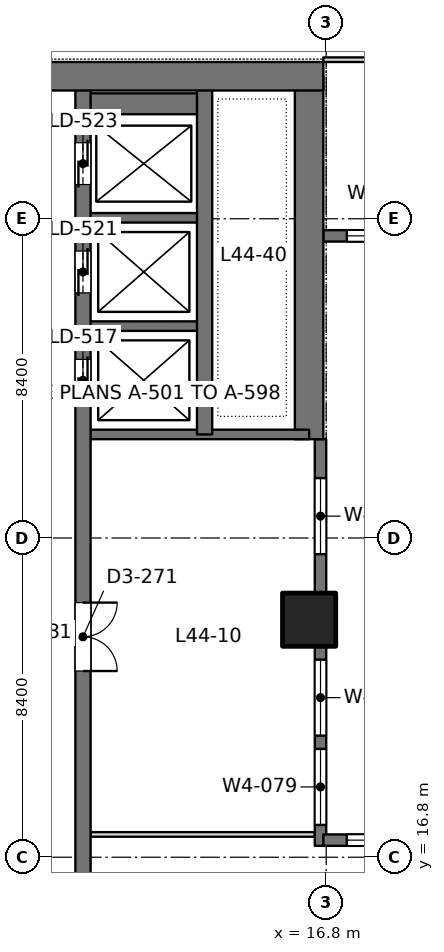
"""IFC4 building model, lengths in metres.
Left out: names, types, materials, properties, quantities, classifications, styles, units other than length and angle.
Written with IfcOpenShell. Run it as: python <this file> out.ifc"""

import sys

from ifc_helpers import new_model, si_unit, direction, frame, frame_2d, origin, origin_2d, place, context, subcontext, project, spatial, rectangle, extrude, element, fill, save


model = new_model("IFC4")
c1 = context("Model", 3, precision=1e-05, world=origin(), true_north=direction((0.0, 1.0)))
c2 = subcontext(c1, "Body", "Model", "MODEL_VIEW")
j1 = project(units=[si_unit("LENGTHUNIT", "METRE"), si_unit("PLANEANGLEUNIT", "RADIAN")], contexts=[c1])
p1 = place(None, origin())
s1 = spatial("IfcSite", under=j1, at=p1, CompositionType="ELEMENT")
p2 = place(p1, origin())
s2 = spatial("IfcBuilding", under=s1, at=p2, CompositionType="ELEMENT")
p3 = place(p2, frame((0.0, 0.0, 194.4)))
s3 = spatial("IfcBuildingStorey", under=s2, at=p3, CompositionType="ELEMENT", Elevation=194.4)
p4 = place(p3, frame((16.35, 23.05, 0.0), z_axis=(0.0, 0.0, 1.0), x_axis=(1.0, 0.0, 0.0)))
e1 = element("IfcColumn", 1, at=p4, inside=s3, PredefinedType="COLUMN", context=c2, shape_type="SweptSolid", body=[
    extrude(rectangle(XDim=1.4, YDim=1.4, at=origin_2d()), origin(), (0.0, 0.0, 1.0), 4.2),
])
p5 = place(p3, frame((-1.125, 37.35, 0.0), z_axis=(0.0, 0.0, 1.0), x_axis=(1.0, 0.0, 0.0)))
e2 = element("IfcWall", 2, at=p5, inside=s3, PredefinedType="SHEAR", context=c2, shape_type="SweptSolid", body=[
    extrude(rectangle(XDim=17.85, YDim=0.75, at=frame_2d((8.925, 0.0))), origin(), (0.0, 0.0, 1.0), 4.2),
])
p6 = place(p5, frame((8.875, 0.0, 0.0)))
e3 = element("IfcOpeningElement", 3, at=p6, cuts=e2, PredefinedType="OPENING", context=c2, shape_type="SweptSolid", body=[
    extrude(rectangle(XDim=1.8, YDim=2.4, at=frame_2d((0.9, 1.2))), frame((0.0, 0.385, 0.0), z_axis=(0.0, -1.0, 0.0), x_axis=(1.0, 0.0, 0.0)), (0.0, 0.0, 1.0), 0.77),
])
p7 = place(p3, frame((16.35, 27.8, 0.0), z_axis=(0.0, 0.0, 1.0), x_axis=(0.0, 1.0, 0.0)))
e4 = element("IfcWall", 4, at=p7, inside=s3, PredefinedType="SHEAR", context=c2, shape_type="SweptSolid", body=[
    extrude(rectangle(XDim=9.55, YDim=0.75, at=frame_2d((4.775, 0.0))), origin(), (0.0, 0.0, 1.0), 4.2),
])
p8 = place(p3, frame((10.4, 13.05, 0.0), z_axis=(0.0, 0.0, 1.0), x_axis=(0.0, 1.0, 0.0)))
e5 = element("IfcWall", 5, at=p8, inside=s3, PredefinedType="SHEAR", context=c2, shape_type="SweptSolid", body=[
    extrude(rectangle(XDim=24.3, YDim=0.4, at=frame_2d((12.15, 0.0))), origin(), (0.0, 0.0, 1.0), 4.2),
])
p9 = place(p8, frame((15.75, 0.0, 0.0)))
e6 = element("IfcOpeningElement", 6, at=p9, cuts=e5, PredefinedType="OPENING", context=c2, shape_type="SweptSolid", body=[
    extrude(rectangle(XDim=1.1, YDim=2.2, at=frame_2d((0.55, 1.1))), frame((0.0, 0.21, 0.0), z_axis=(0.0, -1.0, 0.0), x_axis=(1.0, 0.0, 0.0)), (0.0, 0.0, 1.0), 0.42),
])
p10 = place(p8, frame((18.6, 0.0, 0.0)))
e7 = element("IfcOpeningElement", 7, at=p10, cuts=e5, PredefinedType="OPENING", context=c2, shape_type="SweptSolid", body=[
    extrude(rectangle(XDim=1.1, YDim=2.2, at=frame_2d((0.55, 1.1))), frame((0.0, 0.21, 0.0), z_axis=(0.0, -1.0, 0.0), x_axis=(1.0, 0.0, 0.0)), (0.0, 0.0, 1.0), 0.42),
])
p11 = place(p8, frame((21.45, 0.0, 0.0)))
e8 = element("IfcOpeningElement", 8, at=p11, cuts=e5, PredefinedType="OPENING", context=c2, shape_type="SweptSolid", body=[
    extrude(rectangle(XDim=1.1, YDim=2.2, at=frame_2d((0.55, 1.1))), frame((0.0, 0.21, 0.0), z_axis=(0.0, -1.0, 0.0), x_axis=(1.0, 0.0, 0.0)), (0.0, 0.0, 1.0), 0.42),
])
p12 = place(p8, frame((8.65, 0.0, 0.0)))
e9 = element("IfcOpeningElement", 9, at=p12, cuts=e5, PredefinedType="OPENING", context=c2, shape_type="SweptSolid", body=[
    extrude(rectangle(XDim=1.8, YDim=2.4, at=frame_2d((0.9, 1.2))), frame((0.0, 0.21, 0.0), z_axis=(0.0, -1.0, 0.0), x_axis=(1.0, 0.0, 0.0)), (0.0, 0.0, 1.0), 0.42),
])
p13 = place(p3, frame((13.6, 27.925, 0.0), z_axis=(0.0, 0.0, 1.0), x_axis=(0.0, 1.0, 0.0)))
e10 = element("IfcWall", 10, at=p13, inside=s3, PredefinedType="SHEAR", context=c2, shape_type="SweptSolid", body=[
    extrude(rectangle(XDim=9.425, YDim=0.4, at=frame_2d((4.712, 0.0))), origin(), (0.0, 0.0, 1.0), 4.2),
])
p14 = place(p3, frame((10.4, 27.925, 0.0), z_axis=(0.0, 0.0, 1.0), x_axis=(1.0, 0.0, 0.0)))
e11 = element("IfcWall", 11, at=p14, inside=s3, PredefinedType="SHEAR", context=c2, shape_type="SweptSolid", body=[
    extrude(rectangle(XDim=5.95, YDim=0.25, at=frame_2d((2.975, 0.0))), origin(), (0.0, 0.0, 1.0), 4.2),
])
for number, where, z_axis, x_axis in (
    (12, (10.4, 30.775, 0.0), (0.0, 0.0, 1.0), (1.0, 0.0, 0.0)),
    (13, (10.4, 33.625, 0.0), (0.0, 0.0, 1.0), (1.0, 0.0, 0.0)),
):
    element("IfcWall", number, at=place(p3, frame(where, z_axis=z_axis, x_axis=x_axis)), inside=s3, PredefinedType="SHEAR", context=c2, shape_type="SweptSolid", body=[
        extrude(rectangle(XDim=3.2, YDim=0.25, at=frame_2d((1.6, 0.0))), origin(), (0.0, 0.0, 1.0), 4.2),
    ])
p15 = place(p3, frame((10.4, 36.625, 0.0), z_axis=(0.0, 0.0, 1.0), x_axis=(1.0, 0.0, 0.0)))
e14 = element("IfcWall", 14, at=p15, inside=s3, PredefinedType="SHEAR", context=c2, shape_type="SweptSolid", body=[
    extrude(rectangle(XDim=3.2, YDim=0.55, at=frame_2d((1.6, 0.0))), origin(), (0.0, 0.0, 1.0), 4.2),
])
p16 = place(p3, frame((16.65, 17.1, 0.0), z_axis=(0.0, 0.0, 1.0), x_axis=(0.0, 1.0, 0.0)))
e15 = element("IfcWall", 15, at=p16, inside=s3, PredefinedType="SOLIDWALL", context=c2, shape_type="SweptSolid", body=[
    extrude(rectangle(XDim=10.7, YDim=0.3, at=frame_2d((5.35, 0.0))), origin(), (0.0, 0.0, 1.0), 4.05),
])
p17 = place(p16, frame((0.55, 0.0, 0.9)))
e16 = element("IfcOpeningElement", 16, at=p17, cuts=e15, PredefinedType="OPENING", context=c2, shape_type="SweptSolid", body=[
    extrude(rectangle(XDim=2.0, YDim=1.9, at=frame_2d((1.0, 0.95))), frame((0.0, 0.16, 0.0), z_axis=(0.0, -1.0, 0.0), x_axis=(1.0, 0.0, 0.0)), (0.0, 0.0, 1.0), 0.32),
])
p18 = place(p16, frame((2.9, 0.0, 0.9)))
e17 = element("IfcOpeningElement", 17, at=p18, cuts=e15, PredefinedType="OPENING", context=c2, shape_type="SweptSolid", body=[
    extrude(rectangle(XDim=2.0, YDim=1.9, at=frame_2d((1.0, 0.95))), frame((0.0, 0.16, 0.0), z_axis=(0.0, -1.0, 0.0), x_axis=(1.0, 0.0, 0.0)), (0.0, 0.0, 1.0), 0.32),
])
p19 = place(p16, frame((7.675, 0.0, 0.9)))
e18 = element("IfcOpeningElement", 18, at=p19, cuts=e15, PredefinedType="OPENING", context=c2, shape_type="SweptSolid", body=[
    extrude(rectangle(XDim=2.0, YDim=1.9, at=frame_2d((1.0, 0.95))), frame((0.0, 0.16, 0.0), z_axis=(0.0, -1.0, 0.0), x_axis=(1.0, 0.0, 0.0)), (0.0, 0.0, 1.0), 0.32),
])
p20 = place(p3, frame((16.725, 17.25, 0.0), z_axis=(0.0, 0.0, 1.0), x_axis=(1.0, 0.0, 0.0)))
e19 = element("IfcWall", 19, at=p20, inside=s3, PredefinedType="SOLIDWALL", context=c2, shape_type="SweptSolid", body=[
    extrude(rectangle(XDim=7.925, YDim=0.3, at=frame_2d((3.962, 0.0))), origin(), (0.0, 0.0, 1.0), 4.05),
])
p21 = place(p20, frame((0.619, 0.0, 0.9)))
e20 = element("IfcOpeningElement", 20, at=p21, cuts=e19, PredefinedType="OPENING", context=c2, shape_type="SweptSolid", body=[
    extrude(rectangle(XDim=2.0, YDim=1.9, at=frame_2d((1.0, 0.95))), frame((0.0, 0.16, 0.0), z_axis=(0.0, -1.0, 0.0), x_axis=(1.0, 0.0, 0.0)), (0.0, 0.0, 1.0), 0.32),
])
p22 = place(p20, frame((3.238, 0.0, 0.9)))
e21 = element("IfcOpeningElement", 21, at=p22, cuts=e19, PredefinedType="OPENING", context=c2, shape_type="SweptSolid", body=[
    extrude(rectangle(XDim=2.0, YDim=1.9, at=frame_2d((1.0, 0.95))), frame((0.0, 0.16, 0.0), z_axis=(0.0, -1.0, 0.0), x_axis=(1.0, 0.0, 0.0)), (0.0, 0.0, 1.0), 0.32),
])
p23 = place(p20, frame((5.856, 0.0, 0.9)))
e22 = element("IfcOpeningElement", 22, at=p23, cuts=e19, PredefinedType="OPENING", context=c2, shape_type="SweptSolid", body=[
    extrude(rectangle(XDim=2.0, YDim=1.9, at=frame_2d((1.0, 0.95))), frame((0.0, 0.16, 0.0), z_axis=(0.0, -1.0, 0.0), x_axis=(1.0, 0.0, 0.0)), (0.0, 0.0, 1.0), 0.32),
])
p24 = place(p3, frame((16.725, 33.15, 0.0), z_axis=(0.0, 0.0, 1.0), x_axis=(1.0, 0.0, 0.0)))
e23 = element("IfcWall", 23, at=p24, inside=s3, PredefinedType="SOLIDWALL", context=c2, shape_type="SweptSolid", body=[
    extrude(rectangle(XDim=7.925, YDim=0.3, at=frame_2d((3.962, 0.0))), origin(), (0.0, 0.0, 1.0), 4.05),
])
p25 = place(p24, frame((0.619, 0.0, 0.9)))
e24 = element("IfcOpeningElement", 24, at=p25, cuts=e23, PredefinedType="OPENING", context=c2, shape_type="SweptSolid", body=[
    extrude(rectangle(XDim=2.0, YDim=1.9, at=frame_2d((1.0, 0.95))), frame((0.0, 0.16, 0.0), z_axis=(0.0, -1.0, 0.0), x_axis=(1.0, 0.0, 0.0)), (0.0, 0.0, 1.0), 0.32),
])
p26 = place(p24, frame((3.238, 0.0, 0.9)))
e25 = element("IfcOpeningElement", 25, at=p26, cuts=e23, PredefinedType="OPENING", context=c2, shape_type="SweptSolid", body=[
    extrude(rectangle(XDim=2.0, YDim=1.9, at=frame_2d((1.0, 0.95))), frame((0.0, 0.16, 0.0), z_axis=(0.0, -1.0, 0.0), x_axis=(1.0, 0.0, 0.0)), (0.0, 0.0, 1.0), 0.32),
])
p27 = place(p24, frame((5.856, 0.0, 0.9)))
e26 = element("IfcOpeningElement", 26, at=p27, cuts=e23, PredefinedType="OPENING", context=c2, shape_type="SweptSolid", body=[
    extrude(rectangle(XDim=2.0, YDim=1.9, at=frame_2d((1.0, 0.95))), frame((0.0, 0.16, 0.0), z_axis=(0.0, -1.0, 0.0), x_axis=(1.0, 0.0, 0.0)), (0.0, 0.0, 1.0), 0.32),
])
p28 = place(p3, frame((10.598, 17.4, 0.0), z_axis=(0.0, 0.0, 1.0), x_axis=(1.0, 0.0, 0.0)))
e27 = element("IfcWall", 27, at=p28, inside=s3, PredefinedType="PARTITIONING", context=c2, shape_type="SweptSolid", body=[
    extrude(rectangle(XDim=5.904, YDim=0.12, at=frame_2d((2.952, 0.0))), origin(), (0.0, 0.0, 1.0), 3.55),
])
p29 = place(p3, frame((16.725, 37.785, 0.0), z_axis=(0.0, 0.0, 1.0), x_axis=(1.0, 0.0, 0.0)))
e28 = element("IfcWall", 28, at=p29, inside=s3, PredefinedType="PARTITIONING", context=c2, shape_type="SweptSolid", body=[
    extrude(rectangle(XDim=16.95, YDim=0.12, at=frame_2d((8.475, 0.0))), origin(), (0.0, 0.0, 1.0), 3.55),
])
p30 = place(p29, frame((7.575, 0.0, 0.0)))
e29 = element("IfcOpeningElement", 29, at=p30, cuts=e28, PredefinedType="OPENING", context=c2, shape_type="SweptSolid", body=[
    extrude(rectangle(XDim=1.8, YDim=2.2, at=frame_2d((0.9, 1.1))), frame((0.0, 0.07, 0.0), z_axis=(0.0, -1.0, 0.0), x_axis=(1.0, 0.0, 0.0)), (0.0, 0.0, 1.0), 0.14),
])
p31 = place(p17, origin())
e30 = element("IfcWindow", 30, at=p31, inside=s3, PartitioningType="SINGLE_PANEL", PredefinedType="WINDOW", context=c2, shape_type="SweptSolid", body=[
    extrude(rectangle(XDim=2.0, YDim=1.9, at=frame_2d((1.0, 0.95))), frame((0.0, 0.03, 0.0), z_axis=(0.0, -1.0, 0.0), x_axis=(1.0, 0.0, 0.0)), (0.0, 0.0, 1.0), 0.06),
])
fill(e16, e30)
p32 = place(p18, origin())
e31 = element("IfcWindow", 31, at=p32, inside=s3, PartitioningType="SINGLE_PANEL", PredefinedType="WINDOW", context=c2, shape_type="SweptSolid", body=[
    extrude(rectangle(XDim=2.0, YDim=1.9, at=frame_2d((1.0, 0.95))), frame((0.0, 0.03, 0.0), z_axis=(0.0, -1.0, 0.0), x_axis=(1.0, 0.0, 0.0)), (0.0, 0.0, 1.0), 0.06),
])
fill(e17, e31)
p33 = place(p19, origin())
e32 = element("IfcWindow", 32, at=p33, inside=s3, PartitioningType="SINGLE_PANEL", PredefinedType="WINDOW", context=c2, shape_type="SweptSolid", body=[
    extrude(rectangle(XDim=2.0, YDim=1.9, at=frame_2d((1.0, 0.95))), frame((0.0, 0.03, 0.0), z_axis=(0.0, -1.0, 0.0), x_axis=(1.0, 0.0, 0.0)), (0.0, 0.0, 1.0), 0.06),
])
fill(e18, e32)
p34 = place(p21, origin())
e33 = element("IfcWindow", 33, at=p34, inside=s3, PartitioningType="SINGLE_PANEL", PredefinedType="WINDOW", context=c2, shape_type="SweptSolid", body=[
    extrude(rectangle(XDim=2.0, YDim=1.9, at=frame_2d((1.0, 0.95))), frame((0.0, 0.03, 0.0), z_axis=(0.0, -1.0, 0.0), x_axis=(1.0, 0.0, 0.0)), (0.0, 0.0, 1.0), 0.06),
])
fill(e20, e33)
p35 = place(p25, origin())
e34 = element("IfcWindow", 34, at=p35, inside=s3, PartitioningType="SINGLE_PANEL", PredefinedType="WINDOW", context=c2, shape_type="SweptSolid", body=[
    extrude(rectangle(XDim=2.0, YDim=1.9, at=frame_2d((1.0, 0.95))), frame((0.0, 0.03, 0.0), z_axis=(0.0, -1.0, 0.0), x_axis=(1.0, 0.0, 0.0)), (0.0, 0.0, 1.0), 0.06),
])
fill(e24, e34)
p36 = place(p9, origin())
e35 = element("IfcDoor", 35, at=p36, inside=s3, OperationType="DOUBLE_DOOR_SLIDING", PredefinedType="DOOR", context=c2, shape_type="SweptSolid", body=[
    extrude(rectangle(XDim=1.1, YDim=2.2, at=frame_2d((0.55, 1.1))), frame((0.0, 0.025, 0.0), z_axis=(0.0, -1.0, 0.0), x_axis=(1.0, 0.0, 0.0)), (0.0, 0.0, 1.0), 0.05),
])
fill(e6, e35)
p37 = place(p10, origin())
e36 = element("IfcDoor", 36, at=p37, inside=s3, OperationType="DOUBLE_DOOR_SLIDING", PredefinedType="DOOR", context=c2, shape_type="SweptSolid", body=[
    extrude(rectangle(XDim=1.1, YDim=2.2, at=frame_2d((0.55, 1.1))), frame((0.0, 0.025, 0.0), z_axis=(0.0, -1.0, 0.0), x_axis=(1.0, 0.0, 0.0)), (0.0, 0.0, 1.0), 0.05),
])
fill(e7, e36)
p38 = place(p11, origin())
e37 = element("IfcDoor", 37, at=p38, inside=s3, OperationType="DOUBLE_DOOR_SLIDING", PredefinedType="DOOR", context=c2, shape_type="SweptSolid", body=[
    extrude(rectangle(XDim=1.1, YDim=2.2, at=frame_2d((0.55, 1.1))), frame((0.0, 0.025, 0.0), z_axis=(0.0, -1.0, 0.0), x_axis=(1.0, 0.0, 0.0)), (0.0, 0.0, 1.0), 0.05),
])
fill(e8, e37)
p39 = place(p12, frame((1.8, 0.0, 0.0), z_axis=(0.0, 0.0, 1.0), x_axis=(-1.0, 0.0, 0.0)))
e38 = element("IfcDoor", 38, at=p39, inside=s3, OperationType="DOUBLE_DOOR_SINGLE_SWING", PredefinedType="DOOR", context=c2, shape_type="SweptSolid", body=[
    extrude(rectangle(XDim=1.8, YDim=2.4, at=frame_2d((0.9, 1.2))), frame((0.0, 0.025, 0.0), z_axis=(0.0, -1.0, 0.0), x_axis=(1.0, 0.0, 0.0)), (0.0, 0.0, 1.0), 0.05),
])
fill(e9, e38)
save(model, sys.argv[1])
